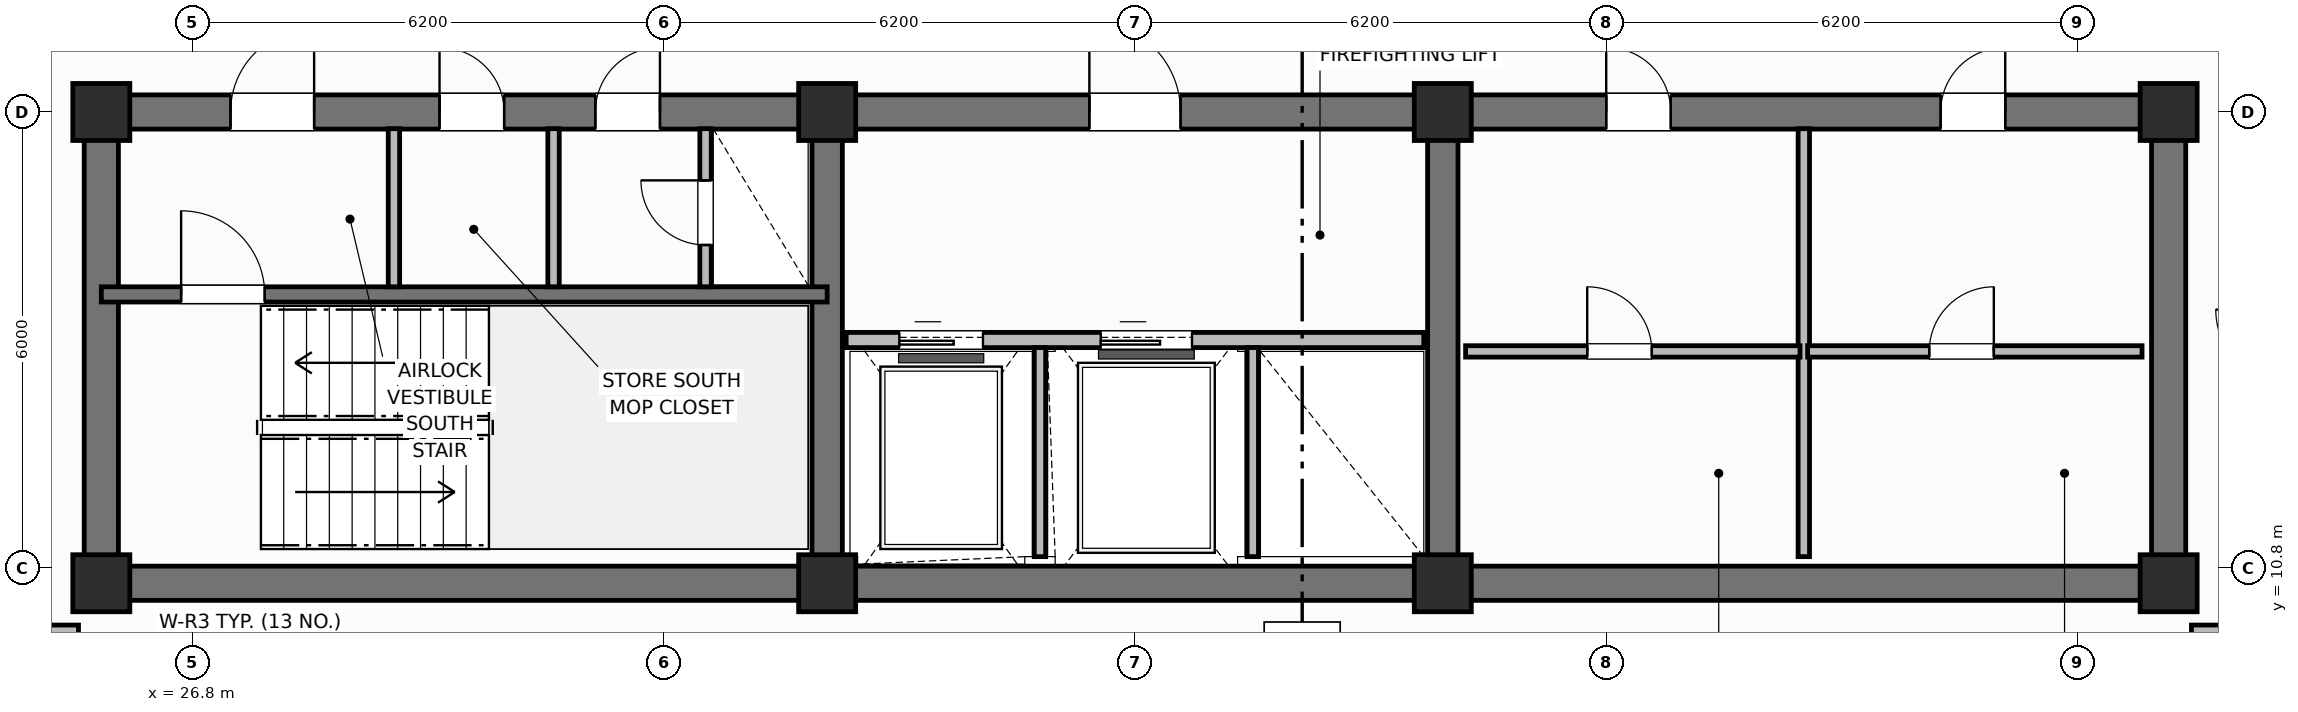
"""IFC4 building model, lengths in metres.
Left out: names, types, materials, properties, quantities, classifications, styles, units other than length and angle.
Written with IfcOpenShell. Run it as: python <this file> out.ifc"""

import sys

from ifc_helpers import new_model, si_unit, direction, frame, frame_2d, origin, origin_2d, place, context, subcontext, project, spatial, rectangle, extrude, element, fill, save


model = new_model("IFC4")
c1 = context("Model", 3, precision=1e-05, world=origin(), true_north=direction((0.0, 1.0)))
c2 = subcontext(c1, "Body", "Model", "MODEL_VIEW")
j1 = project(units=[si_unit("LENGTHUNIT", "METRE"), si_unit("PLANEANGLEUNIT", "RADIAN")], contexts=[c1])
p1 = place(None, origin())
s1 = spatial("IfcSite", under=j1, at=p1, CompositionType="ELEMENT")
p2 = place(p1, origin())
s2 = spatial("IfcBuilding", under=s1, at=p2, CompositionType="ELEMENT")
p3 = place(p2, frame((0.0, 0.0, 271.3)))
s3 = spatial("IfcBuildingStorey", under=s2, at=p3, CompositionType="ELEMENT", Elevation=271.3)
p4 = place(p3, frame((52.8, 10.6, 0.0), z_axis=(0.0, 0.0, 1.0), x_axis=(-1.0, 0.0, 0.0)))
e1 = element("IfcWall", 1, at=p4, inside=s3, PredefinedType="SHEAR", context=c2, shape_type="SweptSolid", body=[
    extrude(rectangle(XDim=27.2, YDim=0.45, at=frame_2d((13.6, 0.0))), origin(), (0.0, 0.0, 1.0), 3.7),
])
for number, where, z_axis, x_axis in (
    (2, (25.6, 10.825, 0.0), (0.0, 0.0, 1.0), (0.0, 1.0, 0.0)),
    (3, (52.8, 10.825, 0.0), (0.0, 0.0, 1.0), (0.0, 1.0, 0.0)),
):
    element("IfcWall", number, at=place(p3, frame(where, z_axis=z_axis, x_axis=x_axis)), inside=s3, PredefinedType="SHEAR", context=c2, shape_type="SweptSolid", body=[
        extrude(rectangle(XDim=5.75, YDim=0.45, at=frame_2d((2.875, 0.0))), origin(), (0.0, 0.0, 1.0), 3.7),
    ])
p5 = place(p3, frame((25.6, 16.8, 0.0), z_axis=(0.0, 0.0, 1.0), x_axis=(1.0, 0.0, 0.0)))
e4 = element("IfcWall", 4, at=p5, inside=s3, PredefinedType="SHEAR", context=c2, shape_type="SweptSolid", body=[
    extrude(rectangle(XDim=27.2, YDim=0.45, at=frame_2d((13.6, 0.0))), origin(), (0.0, 0.0, 1.0), 3.7),
])
p6 = place(p5, frame((1.7, 0.0, 0.0)))
e5 = element("IfcOpeningElement", 5, at=p6, cuts=e4, PredefinedType="OPENING", context=c2, shape_type="SweptSolid", body=[
    extrude(rectangle(XDim=1.1, YDim=2.15, at=frame_2d((0.55, 1.075))), frame((0.0, 0.235, 0.0), z_axis=(0.0, -1.0, 0.0), x_axis=(1.0, 0.0, 0.0)), (0.0, 0.0, 1.0), 0.47),
])
p7 = place(p5, frame((4.45, 0.0, 0.0)))
e6 = element("IfcOpeningElement", 6, at=p7, cuts=e4, PredefinedType="OPENING", context=c2, shape_type="SweptSolid", body=[
    extrude(rectangle(XDim=0.85, YDim=2.1, at=frame_2d((0.425, 1.05))), frame((0.0, 0.235, 0.0), z_axis=(0.0, -1.0, 0.0), x_axis=(1.0, 0.0, 0.0)), (0.0, 0.0, 1.0), 0.47),
])
p8 = place(p5, frame((6.5, 0.0, 0.0)))
e7 = element("IfcOpeningElement", 7, at=p8, cuts=e4, PredefinedType="OPENING", context=c2, shape_type="SweptSolid", body=[
    extrude(rectangle(XDim=0.85, YDim=2.1, at=frame_2d((0.425, 1.05))), frame((0.0, 0.235, 0.0), z_axis=(0.0, -1.0, 0.0), x_axis=(1.0, 0.0, 0.0)), (0.0, 0.0, 1.0), 0.47),
])
p9 = place(p5, frame((13.0, 0.0, 0.0)))
e8 = element("IfcOpeningElement", 8, at=p9, cuts=e4, PredefinedType="OPENING", context=c2, shape_type="SweptSolid", body=[
    extrude(rectangle(XDim=1.2, YDim=2.15, at=frame_2d((0.6, 1.075))), frame((0.0, 0.235, 0.0), z_axis=(0.0, -1.0, 0.0), x_axis=(1.0, 0.0, 0.0)), (0.0, 0.0, 1.0), 0.47),
])
p10 = place(p5, frame((19.8, 0.0, 0.0)))
e9 = element("IfcOpeningElement", 9, at=p10, cuts=e4, PredefinedType="OPENING", context=c2, shape_type="SweptSolid", body=[
    extrude(rectangle(XDim=0.85, YDim=2.1, at=frame_2d((0.425, 1.05))), frame((0.0, 0.235, 0.0), z_axis=(0.0, -1.0, 0.0), x_axis=(1.0, 0.0, 0.0)), (0.0, 0.0, 1.0), 0.47),
])
p11 = place(p5, frame((24.2, 0.0, 0.0)))
e10 = element("IfcOpeningElement", 10, at=p11, cuts=e4, PredefinedType="OPENING", context=c2, shape_type="SweptSolid", body=[
    extrude(rectangle(XDim=0.85, YDim=2.1, at=frame_2d((0.425, 1.05))), frame((0.0, 0.235, 0.0), z_axis=(0.0, -1.0, 0.0), x_axis=(1.0, 0.0, 0.0)), (0.0, 0.0, 1.0), 0.47),
])
for number, where, z_axis, x_axis in (
    (11, (35.15, 10.825, 0.0), (0.0, 0.0, 1.0), (0.0, 1.0, 0.0)),
    (12, (43.25, 10.825, 0.0), (0.0, 0.0, 1.0), (0.0, 1.0, 0.0)),
):
    element("IfcWall", number, at=place(p3, frame(where, z_axis=z_axis, x_axis=x_axis)), inside=s3, PredefinedType="SHEAR", context=c2, shape_type="SweptSolid", body=[
        extrude(rectangle(XDim=5.75, YDim=0.4, at=frame_2d((2.875, 0.0))), origin(), (0.0, 0.0, 1.0), 3.7),
    ])
for number, where, z_axis, x_axis in (
    (13, (25.6, 10.6, 0.0), (0.0, 0.0, 1.0), (1.0, 0.0, 0.0)),
    (14, (25.6, 16.8, 0.0), (0.0, 0.0, 1.0), (1.0, 0.0, 0.0)),
    (15, (35.15, 10.6, 0.0), (0.0, 0.0, 1.0), (1.0, 0.0, 0.0)),
    (16, (35.15, 16.8, 0.0), (0.0, 0.0, 1.0), (1.0, 0.0, 0.0)),
    (17, (43.25, 10.6, 0.0), (0.0, 0.0, 1.0), (1.0, 0.0, 0.0)),
    (18, (43.25, 16.8, 0.0), (0.0, 0.0, 1.0), (1.0, 0.0, 0.0)),
    (19, (52.8, 10.6, 0.0), (0.0, 0.0, 1.0), (1.0, 0.0, 0.0)),
    (20, (52.8, 16.8, 0.0), (0.0, 0.0, 1.0), (1.0, 0.0, 0.0)),
):
    element("IfcColumn", number, at=place(p3, frame(where, z_axis=z_axis, x_axis=x_axis)), inside=s3, PredefinedType="COLUMN", context=c2, shape_type="SweptSolid", body=[
        extrude(rectangle(XDim=0.75, YDim=0.75, at=origin_2d()), origin(), (0.0, 0.0, 1.0), 3.7),
    ])
p12 = place(p3, frame((25.6, 14.4, 0.0), z_axis=(0.0, 0.0, 1.0), x_axis=(1.0, 0.0, 0.0)))
e21 = element("IfcWall", 21, at=p12, inside=s3, PredefinedType="SHEAR", context=c2, shape_type="SweptSolid", body=[
    extrude(rectangle(XDim=9.55, YDim=0.2, at=frame_2d((4.775, 0.0))), origin(), (0.0, 0.0, 1.0), 3.7),
])
p13 = place(p12, frame((1.05, 0.0, 0.0)))
e22 = element("IfcOpeningElement", 22, at=p13, cuts=e21, PredefinedType="OPENING", context=c2, shape_type="SweptSolid", body=[
    extrude(rectangle(XDim=1.1, YDim=2.15, at=frame_2d((0.55, 1.075))), frame((0.0, 0.11, 0.0), z_axis=(0.0, -1.0, 0.0), x_axis=(1.0, 0.0, 0.0)), (0.0, 0.0, 1.0), 0.22),
])
for number, where, z_axis, x_axis in (
    (23, (29.45, 14.5, 0.0), (0.0, 0.0, 1.0), (0.0, 1.0, 0.0)),
    (24, (31.55, 14.5, 0.0), (0.0, 0.0, 1.0), (0.0, 1.0, 0.0)),
):
    element("IfcWall", number, at=place(p3, frame(where, z_axis=z_axis, x_axis=x_axis)), inside=s3, PredefinedType="PARTITIONING", context=c2, shape_type="SweptSolid", body=[
        extrude(rectangle(XDim=2.08, YDim=0.15, at=frame_2d((1.04, 0.0))), origin(), (0.0, 0.0, 1.0), 2.56),
    ])
p14 = place(p3, frame((33.55, 14.5, 0.0), z_axis=(0.0, 0.0, 1.0), x_axis=(0.0, 1.0, 0.0)))
e25 = element("IfcWall", 25, at=p14, inside=s3, PredefinedType="PARTITIONING", context=c2, shape_type="SweptSolid", body=[
    extrude(rectangle(XDim=2.08, YDim=0.15, at=frame_2d((1.04, 0.0))), origin(), (0.0, 0.0, 1.0), 2.56),
])
p15 = place(p14, frame((0.55, 0.0, 0.0)))
e26 = element("IfcOpeningElement", 26, at=p15, cuts=e25, PredefinedType="OPENING", context=c2, shape_type="SweptSolid", body=[
    extrude(rectangle(XDim=0.85, YDim=2.05, at=frame_2d((0.425, 1.025))), frame((0.0, 0.085, 0.0), z_axis=(0.0, -1.0, 0.0), x_axis=(1.0, 0.0, 0.0)), (0.0, 0.0, 1.0), 0.17),
])
p16 = place(p3, frame((35.4, 13.8, 0.0), z_axis=(0.0, 0.0, 1.0), x_axis=(1.0, 0.0, 0.0)))
e27 = element("IfcWall", 27, at=p16, inside=s3, PredefinedType="PARTITIONING", context=c2, shape_type="SweptSolid", body=[
    extrude(rectangle(XDim=7.6, YDim=0.2, at=frame_2d((3.8, 0.0))), origin(), (0.0, 0.0, 1.0), 2.33),
])
p17 = place(p16, frame((0.7, 0.0, 0.0)))
e28 = element("IfcOpeningElement", 28, at=p17, cuts=e27, PredefinedType="OPENING", context=c2, shape_type="SweptSolid", body=[
    extrude(rectangle(XDim=1.1, YDim=2.15, at=frame_2d((0.55, 1.075))), frame((0.0, 0.11, 0.0), z_axis=(0.0, -1.0, 0.0), x_axis=(1.0, 0.0, 0.0)), (0.0, 0.0, 1.0), 0.22),
])
p18 = place(p16, frame((3.35, 0.0, 0.0)))
e29 = element("IfcOpeningElement", 29, at=p18, cuts=e27, PredefinedType="OPENING", context=c2, shape_type="SweptSolid", body=[
    extrude(rectangle(XDim=1.2, YDim=2.15, at=frame_2d((0.6, 1.075))), frame((0.0, 0.11, 0.0), z_axis=(0.0, -1.0, 0.0), x_axis=(1.0, 0.0, 0.0)), (0.0, 0.0, 1.0), 0.22),
])
for number, where, z_axis, x_axis in (
    (30, (37.95, 10.95, 0.0), (0.0, 0.0, 1.0), (0.0, 1.0, 0.0)),
    (31, (40.75, 10.95, 0.0), (0.0, 0.0, 1.0), (0.0, 1.0, 0.0)),
):
    element("IfcWall", number, at=place(p3, frame(where, z_axis=z_axis, x_axis=x_axis)), inside=s3, PredefinedType="PARTITIONING", context=c2, shape_type="SweptSolid", body=[
        extrude(rectangle(XDim=2.75, YDim=0.15, at=frame_2d((1.375, 0.0))), origin(), (0.0, 0.0, 1.0), 2.56),
    ])
p19 = place(p3, frame((48.0, 10.95, 0.0), z_axis=(0.0, 0.0, 1.0), x_axis=(0.0, 1.0, 0.0)))
e32 = element("IfcWall", 32, at=p19, inside=s3, PredefinedType="PARTITIONING", context=c2, shape_type="SweptSolid", body=[
    extrude(rectangle(XDim=5.63, YDim=0.15, at=frame_2d((2.815, 0.0))), origin(), (0.0, 0.0, 1.0), 2.56),
])
p20 = place(p3, frame((43.55, 13.65, 0.0), z_axis=(0.0, 0.0, 1.0), x_axis=(1.0, 0.0, 0.0)))
e33 = element("IfcWall", 33, at=p20, inside=s3, PredefinedType="PARTITIONING", context=c2, shape_type="SweptSolid", body=[
    extrude(rectangle(XDim=4.4, YDim=0.15, at=frame_2d((2.2, 0.0))), origin(), (0.0, 0.0, 1.0), 2.56),
])
p21 = place(p20, frame((1.6, 0.0, 0.0)))
e34 = element("IfcOpeningElement", 34, at=p21, cuts=e33, PredefinedType="OPENING", context=c2, shape_type="SweptSolid", body=[
    extrude(rectangle(XDim=0.85, YDim=2.1, at=frame_2d((0.425, 1.05))), frame((0.0, 0.085, 0.0), z_axis=(0.0, -1.0, 0.0), x_axis=(1.0, 0.0, 0.0)), (0.0, 0.0, 1.0), 0.17),
])
p22 = place(p3, frame((48.05, 13.65, 0.0), z_axis=(0.0, 0.0, 1.0), x_axis=(1.0, 0.0, 0.0)))
e35 = element("IfcWall", 35, at=p22, inside=s3, PredefinedType="PARTITIONING", context=c2, shape_type="SweptSolid", body=[
    extrude(rectangle(XDim=4.4, YDim=0.15, at=frame_2d((2.2, 0.0))), origin(), (0.0, 0.0, 1.0), 2.56),
])
p23 = place(p22, frame((1.6, 0.0, 0.0)))
e36 = element("IfcOpeningElement", 36, at=p23, cuts=e35, PredefinedType="OPENING", context=c2, shape_type="SweptSolid", body=[
    extrude(rectangle(XDim=0.85, YDim=2.1, at=frame_2d((0.425, 1.05))), frame((0.0, 0.085, 0.0), z_axis=(0.0, -1.0, 0.0), x_axis=(1.0, 0.0, 0.0)), (0.0, 0.0, 1.0), 0.17),
])
p24 = place(p3, frame((21.546, 9.95, 0.0), z_axis=(0.0, 0.0, 1.0), x_axis=(1.0, 0.0, 0.0)))
e37 = element("IfcWall", 37, at=p24, inside=s3, PredefinedType="PARTITIONING", context=c2, shape_type="SweptSolid", body=[
    extrude(rectangle(XDim=3.754, YDim=0.2, at=frame_2d((1.877, 0.0))), origin(), (0.0, 0.0, 1.0), 2.56),
])
p25 = place(p3, frame((53.1, 9.95, 0.0), z_axis=(0.0, 0.0, 1.0), x_axis=(1.0, 0.0, 0.0)))
e38 = element("IfcWall", 38, at=p25, inside=s3, PredefinedType="PARTITIONING", context=c2, shape_type="SweptSolid", body=[
    extrude(rectangle(XDim=3.754, YDim=0.2, at=frame_2d((1.877, 0.0))), origin(), (0.0, 0.0, 1.0), 2.56),
])
p26 = place(p13, origin())
e39 = element("IfcDoor", 39, at=p26, inside=s3, OperationType="SINGLE_SWING_LEFT", PredefinedType="DOOR", context=c2, shape_type="SweptSolid", body=[
    extrude(rectangle(XDim=1.1, YDim=2.15, at=frame_2d((0.55, 1.075))), frame((0.0, 0.025, 0.0), z_axis=(0.0, -1.0, 0.0), x_axis=(1.0, 0.0, 0.0)), (0.0, 0.0, 1.0), 0.05),
])
fill(e22, e39)
p27 = place(p15, origin())
e40 = element("IfcDoor", 40, at=p27, inside=s3, OperationType="SINGLE_SWING_RIGHT", PredefinedType="TRAPDOOR", context=c2, shape_type="SweptSolid", body=[
    extrude(rectangle(XDim=0.85, YDim=2.05, at=frame_2d((0.425, 1.025))), frame((0.0, 0.025, 0.0), z_axis=(0.0, -1.0, 0.0), x_axis=(1.0, 0.0, 0.0)), (0.0, 0.0, 1.0), 0.05),
])
fill(e26, e40)
p28 = place(p17, origin())
e41 = element("IfcDoor", 41, at=p28, inside=s3, OperationType="SLIDING_TO_LEFT", PredefinedType="DOOR", context=c2, shape_type="SweptSolid", body=[
    extrude(rectangle(XDim=1.1, YDim=2.15, at=frame_2d((0.55, 1.075))), frame((0.0, 0.025, 0.0), z_axis=(0.0, -1.0, 0.0), x_axis=(1.0, 0.0, 0.0)), (0.0, 0.0, 1.0), 0.05),
])
fill(e28, e41)
p29 = place(p18, origin())
e42 = element("IfcDoor", 42, at=p29, inside=s3, OperationType="SLIDING_TO_LEFT", PredefinedType="DOOR", context=c2, shape_type="SweptSolid", body=[
    extrude(rectangle(XDim=1.2, YDim=2.15, at=frame_2d((0.6, 1.075))), frame((0.0, 0.025, 0.0), z_axis=(0.0, -1.0, 0.0), x_axis=(1.0, 0.0, 0.0)), (0.0, 0.0, 1.0), 0.05),
])
fill(e29, e42)
p30 = place(p21, origin())
e43 = element("IfcDoor", 43, at=p30, inside=s3, OperationType="SINGLE_SWING_LEFT", PredefinedType="DOOR", context=c2, shape_type="SweptSolid", body=[
    extrude(rectangle(XDim=0.85, YDim=2.1, at=frame_2d((0.425, 1.05))), frame((0.0, 0.025, 0.0), z_axis=(0.0, -1.0, 0.0), x_axis=(1.0, 0.0, 0.0)), (0.0, 0.0, 1.0), 0.05),
])
fill(e34, e43)
p31 = place(p23, origin())
e44 = element("IfcDoor", 44, at=p31, inside=s3, OperationType="SINGLE_SWING_RIGHT", PredefinedType="DOOR", context=c2, shape_type="SweptSolid", body=[
    extrude(rectangle(XDim=0.85, YDim=2.1, at=frame_2d((0.425, 1.05))), frame((0.0, 0.025, 0.0), z_axis=(0.0, -1.0, 0.0), x_axis=(1.0, 0.0, 0.0)), (0.0, 0.0, 1.0), 0.05),
])
fill(e36, e44)
p32 = place(p6, origin())
e45 = element("IfcDoor", 45, at=p32, inside=s3, OperationType="SINGLE_SWING_RIGHT", PredefinedType="DOOR", context=c2, shape_type="SweptSolid", body=[
    extrude(rectangle(XDim=1.1, YDim=2.15, at=frame_2d((0.55, 1.075))), frame((0.0, 0.025, 0.0), z_axis=(0.0, -1.0, 0.0), x_axis=(1.0, 0.0, 0.0)), (0.0, 0.0, 1.0), 0.05),
])
fill(e5, e45)
p33 = place(p7, origin())
e46 = element("IfcDoor", 46, at=p33, inside=s3, OperationType="SINGLE_SWING_LEFT", PredefinedType="DOOR", context=c2, shape_type="SweptSolid", body=[
    extrude(rectangle(XDim=0.85, YDim=2.1, at=frame_2d((0.425, 1.05))), frame((0.0, 0.025, 0.0), z_axis=(0.0, -1.0, 0.0), x_axis=(1.0, 0.0, 0.0)), (0.0, 0.0, 1.0), 0.05),
])
fill(e6, e46)
p34 = place(p8, origin())
e47 = element("IfcDoor", 47, at=p34, inside=s3, OperationType="SINGLE_SWING_RIGHT", PredefinedType="DOOR", context=c2, shape_type="SweptSolid", body=[
    extrude(rectangle(XDim=0.85, YDim=2.1, at=frame_2d((0.425, 1.05))), frame((0.0, 0.025, 0.0), z_axis=(0.0, -1.0, 0.0), x_axis=(1.0, 0.0, 0.0)), (0.0, 0.0, 1.0), 0.05),
])
fill(e7, e47)
p35 = place(p9, origin())
e48 = element("IfcDoor", 48, at=p35, inside=s3, OperationType="SINGLE_SWING_LEFT", PredefinedType="DOOR", context=c2, shape_type="SweptSolid", body=[
    extrude(rectangle(XDim=1.2, YDim=2.15, at=frame_2d((0.6, 1.075))), frame((0.0, 0.025, 0.0), z_axis=(0.0, -1.0, 0.0), x_axis=(1.0, 0.0, 0.0)), (0.0, 0.0, 1.0), 0.05),
])
fill(e8, e48)
p36 = place(p10, origin())
e49 = element("IfcDoor", 49, at=p36, inside=s3, OperationType="SINGLE_SWING_LEFT", PredefinedType="DOOR", context=c2, shape_type="SweptSolid", body=[
    extrude(rectangle(XDim=0.85, YDim=2.1, at=frame_2d((0.425, 1.05))), frame((0.0, 0.025, 0.0), z_axis=(0.0, -1.0, 0.0), x_axis=(1.0, 0.0, 0.0)), (0.0, 0.0, 1.0), 0.05),
])
fill(e9, e49)
p37 = place(p11, origin())
e50 = element("IfcDoor", 50, at=p37, inside=s3, OperationType="SINGLE_SWING_RIGHT", PredefinedType="DOOR", context=c2, shape_type="SweptSolid", body=[
    extrude(rectangle(XDim=0.85, YDim=2.1, at=frame_2d((0.425, 1.05))), frame((0.0, 0.025, 0.0), z_axis=(0.0, -1.0, 0.0), x_axis=(1.0, 0.0, 0.0)), (0.0, 0.0, 1.0), 0.05),
])
fill(e10, e50)
save(model, sys.argv[1])
